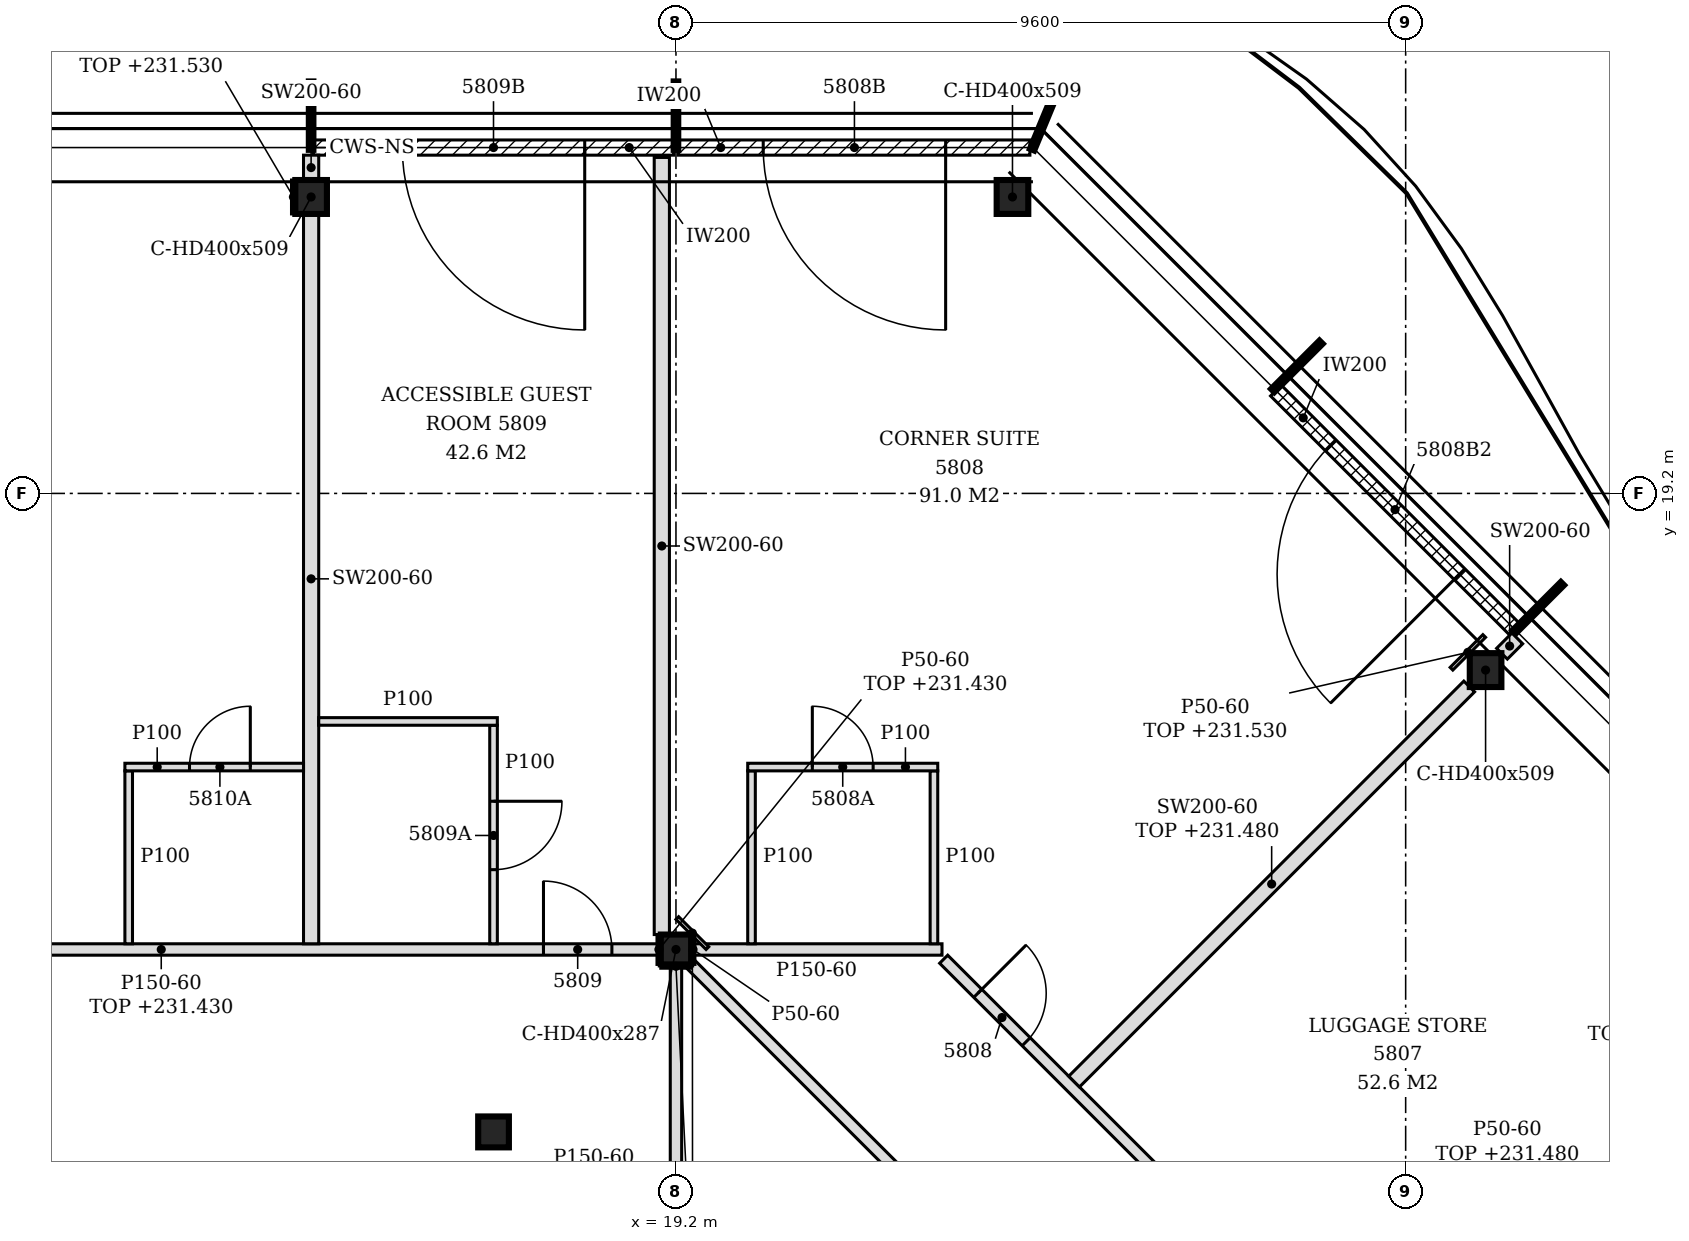
"""IFC4 building model, lengths in metres.
Left out: names, types, materials, properties, quantities, classifications, styles, units other than length and angle.
Written with IfcOpenShell. Run it as: python <this file> out.ifc"""

import sys

from ifc_helpers import new_model, si_unit, direction, frame, frame_2d, origin, origin_2d, place, context, subcontext, project, spatial, polyline, rectangle, i_section, outline, extrude, element, fill, save


model = new_model("IFC4")
c1 = context("Model", 3, precision=1e-05, world=origin(), true_north=direction((0.0, 1.0)))
c2 = subcontext(c1, "Body", "Model", "MODEL_VIEW")
j1 = project(units=[si_unit("LENGTHUNIT", "METRE"), si_unit("PLANEANGLEUNIT", "RADIAN")], contexts=[c1])
p1 = place(None, origin())
s1 = spatial("IfcSite", under=j1, at=p1, CompositionType="ELEMENT")
p2 = place(p1, origin())
s2 = spatial("IfcBuilding", under=s1, at=p2, CompositionType="ELEMENT")
p3 = place(p2, frame((0.0, 0.0, 228.6)))
s3 = spatial("IfcBuildingStorey", under=s2, at=p3, CompositionType="ELEMENT", Elevation=228.6)
for number, where, z_axis, x_axis in (
    (1, (29.852, 16.876, -0.15), (0.0, 0.0, 1.0), (1.0, 0.0, 0.0)),
    (2, (23.627, 23.1, -0.15), (0.0, 0.0, 1.0), (1.0, 0.0, 0.0)),
    (3, (14.4, 23.1, -0.15), (0.0, 0.0, 1.0), (1.0, 0.0, 0.0)),
):
    element("IfcColumn", number, at=place(p3, frame(where, z_axis=z_axis, x_axis=x_axis)), inside=s3, PredefinedType="COLUMN", context=c2, shape_type="SweptSolid", body=[
        extrude(i_section(OverallWidth=0.416, OverallDepth=0.446, WebThickness=0.039, FlangeThickness=0.063, FilletRadius=0.015, at=origin_2d()), origin(), (0.0, 0.0, 1.0), 3.6),
    ])
p4 = place(p3, frame((19.2, 13.2, -0.15), z_axis=(0.0, 0.0, 1.0), x_axis=(1.0, 0.0, 0.0)))
e4 = element("IfcColumn", 4, at=p4, inside=s3, PredefinedType="COLUMN", context=c2, shape_type="SweptSolid", body=[
    extrude(i_section(OverallWidth=0.399, OverallDepth=0.393, WebThickness=0.023, FlangeThickness=0.037, FilletRadius=0.015, at=origin_2d()), origin(), (0.0, 0.0, 1.0), 3.6),
])
p5 = place(p3, frame((16.8, 10.8, -0.15), z_axis=(0.0, 0.0, 1.0), x_axis=(1.0, 0.0, 0.0)))
e5 = element("IfcColumn", 5, at=p5, inside=s3, PredefinedType="COLUMN", context=c2, shape_type="SweptSolid", body=[
    extrude(i_section(OverallWidth=0.404, OverallDepth=0.407, WebThickness=0.027, FlangeThickness=0.044, FilletRadius=0.015, at=origin_2d()), origin(), (0.0, 0.0, 1.0), 3.6),
])
p6 = place(p3, frame((30.226, 17.42, 0.0), z_axis=(0.0, 0.0, 1.0), x_axis=(-0.707079231393, 0.707134329907, 0.0)))
e6 = element("IfcWall", 6, at=p6, inside=s3, PredefinedType="NOTDEFINED", context=c2, shape_type="SweptSolid", body=[
    extrude(rectangle(XDim=4.431, YDim=0.2, at=frame_2d((2.215, 0.0))), origin(), (0.0, 0.0, 1.0), 3.45),
])
p7 = place(p6, frame((1.015, 0.0, 0.0)))
e7 = element("IfcOpeningElement", 7, at=p7, cuts=e6, PredefinedType="OPENING", context=c2, shape_type="SweptSolid", body=[
    extrude(rectangle(XDim=2.4, YDim=2.4, at=frame_2d((1.2, 1.2))), frame((0.0, 0.11, 0.0), z_axis=(0.0, -1.0, 0.0), x_axis=(1.0, 0.0, 0.0)), (0.0, 0.0, 1.0), 0.22),
])
p8 = place(p3, frame((23.856, 23.75, 0.0), z_axis=(0.0, 0.0, 1.0), x_axis=(-1.0, 0.0, 0.0)))
e8 = element("IfcWall", 8, at=p8, inside=s3, PredefinedType="NOTDEFINED", context=c2, shape_type="SweptSolid", body=[
    extrude(rectangle(XDim=4.626, YDim=0.2, at=frame_2d((2.313, 0.0))), origin(), (0.0, 0.0, 1.0), 3.45),
])
p9 = place(p8, frame((1.108, 0.0, 0.0)))
e9 = element("IfcOpeningElement", 9, at=p9, cuts=e8, PredefinedType="OPENING", context=c2, shape_type="SweptSolid", body=[
    extrude(rectangle(XDim=2.4, YDim=2.4, at=frame_2d((1.2, 1.2))), frame((0.0, 0.11, 0.0), z_axis=(0.0, -1.0, 0.0), x_axis=(1.0, 0.0, 0.0)), (0.0, 0.0, 1.0), 0.22),
])
p10 = place(p3, frame((19.17, 23.75, 0.0), z_axis=(0.0, 0.0, 1.0), x_axis=(-1.0, 0.0, 0.0)))
e10 = element("IfcWall", 10, at=p10, inside=s3, PredefinedType="NOTDEFINED", context=c2, shape_type="SweptSolid", body=[
    extrude(rectangle(XDim=4.74, YDim=0.2, at=frame_2d((2.37, 0.0))), origin(), (0.0, 0.0, 1.0), 3.45),
])
p11 = place(p10, frame((1.17, 0.0, 0.0)))
e11 = element("IfcOpeningElement", 11, at=p11, cuts=e10, PredefinedType="OPENING", context=c2, shape_type="SweptSolid", body=[
    extrude(rectangle(XDim=2.4, YDim=2.4, at=frame_2d((1.2, 1.2))), frame((0.0, 0.11, 0.0), z_axis=(0.0, -1.0, 0.0), x_axis=(1.0, 0.0, 0.0)), (0.0, 0.0, 1.0), 0.22),
])
p12 = place(p3, frame((33.341, 2.453, 0.0), z_axis=(0.0, 0.0, 1.0), x_axis=(-0.707098652635, 0.707114909645, 0.0)))
e12 = element("IfcWall", 12, at=p12, inside=s3, PredefinedType="PARTITIONING", context=c2, shape_type="SweptSolid", body=[
    extrude(rectangle(XDim=15.018, YDim=0.15, at=frame_2d((7.509, 0.0))), origin(), (0.0, 0.0, 1.0), 2.88),
])
p13 = place(p12, frame((4.766, 0.0, 0.0)))
e13 = element("IfcOpeningElement", 13, at=p13, cuts=e12, PredefinedType="OPENING", context=c2, shape_type="SweptSolid", body=[
    extrude(rectangle(XDim=0.9, YDim=2.1, at=frame_2d((0.45, 1.05))), frame((0.0, 0.085, 0.0), z_axis=(0.0, -1.0, 0.0), x_axis=(1.0, 0.0, 0.0)), (0.0, 0.0, 1.0), 0.17),
])
p14 = place(p12, frame((9.167, 0.0, 0.0)))
e14 = element("IfcOpeningElement", 14, at=p14, cuts=e12, PredefinedType="OPENING", context=c2, shape_type="SweptSolid", body=[
    extrude(rectangle(XDim=0.9, YDim=2.1, at=frame_2d((0.45, 1.05))), frame((0.0, 0.085, 0.0), z_axis=(0.0, -1.0, 0.0), x_axis=(1.0, 0.0, 0.0)), (0.0, 0.0, 1.0), 0.17),
])
p15 = place(p12, frame((13.482, 0.0, 0.0)))
e15 = element("IfcOpeningElement", 15, at=p15, cuts=e12, PredefinedType="OPENING", context=c2, shape_type="SweptSolid", body=[
    extrude(rectangle(XDim=0.9, YDim=2.1, at=frame_2d((0.45, 1.05))), frame((0.0, 0.085, 0.0), z_axis=(0.0, -1.0, 0.0), x_axis=(1.0, 0.0, 0.0)), (0.0, 0.0, 1.0), 0.17),
])
p16 = place(p3, frame((19.2, 3.675, 0.0), z_axis=(0.0, 0.0, 1.0), x_axis=(0.0, 1.0, 0.0)))
e16 = element("IfcWall", 16, at=p16, inside=s3, PredefinedType="PARTITIONING", context=c2, shape_type="SweptSolid", body=[
    extrude(rectangle(XDim=9.328, YDim=0.15, at=frame_2d((4.664, 0.0))), origin(), (0.0, 0.0, 1.0), 2.83),
])
p17 = place(p16, frame((3.125, 0.0, 0.0)))
e17 = element("IfcOpeningElement", 17, at=p17, cuts=e16, PredefinedType="OPENING", context=c2, shape_type="SweptSolid", body=[
    extrude(rectangle(XDim=0.8, YDim=2.1, at=frame_2d((0.4, 1.05))), frame((0.0, 0.085, 0.0), z_axis=(0.0, -1.0, 0.0), x_axis=(1.0, 0.0, 0.0)), (0.0, 0.0, 1.0), 0.17),
])
p18 = place(p3, frame((28.672, 3.728, 0.0), z_axis=(0.0, 0.0, 1.0), x_axis=(-0.707116088468, 0.707097473782, 0.0)))
e18 = element("IfcWall", 18, at=p18, inside=s3, PredefinedType="PARTITIONING", context=c2, shape_type="SweptSolid", body=[
    extrude(rectangle(XDim=13.115, YDim=0.15, at=frame_2d((6.558, 0.0))), origin(), (0.0, 0.0, 1.0), 2.88),
])
p19 = place(p18, frame((6.157, 0.0, 0.0)))
e19 = element("IfcOpeningElement", 19, at=p19, cuts=e18, PredefinedType="OPENING", context=c2, shape_type="SweptSolid", body=[
    extrude(rectangle(XDim=0.9, YDim=2.1, at=frame_2d((0.45, 1.05))), frame((0.0, 0.085, 0.0), z_axis=(0.0, -1.0, 0.0), x_axis=(1.0, 0.0, 0.0)), (0.0, 0.0, 1.0), 0.17),
])
p20 = place(p3, frame((30.662, 5.238, 0.0), z_axis=(0.0, 0.0, 1.0), x_axis=(0.707106781187, 0.707106781187, 0.0)))
e20 = element("IfcWall", 20, at=p20, inside=s3, PredefinedType="PARTITIONING", context=c2, shape_type="SweptSolid", body=[
    extrude(rectangle(XDim=7.351, YDim=0.2, at=frame_2d((3.676, 0.0))), origin(), (0.0, 0.0, 1.0), 2.93),
])
p21 = place(p3, frame((31.398, 9.798, 0.0), z_axis=(0.0, 0.0, 1.0), x_axis=(0.707133900936, 0.707079660397, 0.0)))
e21 = element("IfcWall", 21, at=p21, inside=s3, PredefinedType="PARTITIONING", context=c2, shape_type="SweptSolid", body=[
    extrude(rectangle(XDim=4.501, YDim=0.2, at=frame_2d((2.25, 0.0))), origin(), (0.0, 0.0, 1.0), 2.63),
])
p22 = place(p3, frame((24.438, 11.462, 0.0), z_axis=(0.0, 0.0, 1.0), x_axis=(0.707090175614, 0.707123386369, 0.0)))
e22 = element("IfcWall", 22, at=p22, inside=s3, PredefinedType="PARTITIONING", context=c2, shape_type="SweptSolid", body=[
    extrude(rectangle(XDim=7.351, YDim=0.2, at=frame_2d((3.676, 0.0))), origin(), (0.0, 0.0, 1.0), 2.88),
])
p23 = place(p3, frame((7.399, 13.2, 0.0), z_axis=(0.0, 0.0, 1.0), x_axis=(1.0, 0.0, 0.0)))
e23 = element("IfcWall", 23, at=p23, inside=s3, PredefinedType="PARTITIONING", context=c2, shape_type="SweptSolid", body=[
    extrude(rectangle(XDim=11.601, YDim=0.15, at=frame_2d((5.801, 0.0))), origin(), (0.0, 0.0, 1.0), 2.83),
])
p24 = place(p23, frame((10.058, 0.0, 0.0)))
e24 = element("IfcOpeningElement", 24, at=p24, cuts=e23, PredefinedType="OPENING", context=c2, shape_type="SweptSolid", body=[
    extrude(rectangle(XDim=0.9, YDim=2.1, at=frame_2d((0.45, 1.05))), frame((0.0, 0.085, 0.0), z_axis=(0.0, -1.0, 0.0), x_axis=(1.0, 0.0, 0.0)), (0.0, 0.0, 1.0), 0.17),
])
p25 = place(p3, frame((19.399, 13.2, 0.0), z_axis=(0.0, 0.0, 1.0), x_axis=(1.0, 0.0, 0.0)))
e25 = element("IfcWall", 25, at=p25, inside=s3, PredefinedType="PARTITIONING", context=c2, shape_type="SweptSolid", body=[
    extrude(rectangle(XDim=3.301, YDim=0.15, at=frame_2d((1.65, 0.0))), origin(), (0.0, 0.0, 1.0), 3.45),
])
p26 = place(p3, frame((12.0, 13.275, 0.0), z_axis=(0.0, 0.0, 1.0), x_axis=(0.0, 1.0, 0.0)))
e26 = element("IfcWall", 26, at=p26, inside=s3, PredefinedType="PARTITIONING", context=c2, shape_type="SweptSolid", body=[
    extrude(outline(polyline([(0.0, 0.0), (2.275, 0.0), (2.275, 3.45), (0.075, 3.45), (0.073, 2.83), (0.0, 2.83), (0.0, 0.0)])), frame((0.0, 0.05, 0.0), z_axis=(0.0, -1.0, 0.0), x_axis=(1.0, 0.0, 0.0)), (0.0, 0.0, 1.0), 0.1),
])
p27 = place(p3, frame((14.4, 13.275, 0.0), z_axis=(0.0, 0.0, 1.0), x_axis=(0.0, 1.0, 0.0)))
e27 = element("IfcWall", 27, at=p27, inside=s3, PredefinedType="PARTITIONING", context=c2, shape_type="SweptSolid", body=[
    extrude(outline(polyline([(0.0, 0.0), (9.602, 0.0), (9.602, 3.45), (6.03, 3.45), (6.028, 2.88), (5.82, 2.88), (5.818, 3.45), (0.075, 3.45), (0.073, 2.83), (0.0, 2.83), (0.0, 0.0)])), frame((0.0, 0.1, 0.0), z_axis=(0.0, -1.0, 0.0), x_axis=(1.0, 0.0, 0.0)), (0.0, 0.0, 1.0), 0.2),
])
p28 = place(p3, frame((16.8, 13.275, 0.0), z_axis=(0.0, 0.0, 1.0), x_axis=(0.0, 1.0, 0.0)))
e28 = element("IfcWall", 28, at=p28, inside=s3, PredefinedType="PARTITIONING", context=c2, shape_type="SweptSolid", body=[
    extrude(outline(polyline([(0.0, 0.0), (2.875, 0.0), (2.875, 3.45), (0.075, 3.45), (0.073, 2.83), (0.0, 2.83), (0.0, 0.0)])), frame((0.0, 0.05, 0.0), z_axis=(0.0, -1.0, 0.0), x_axis=(1.0, 0.0, 0.0)), (0.0, 0.0, 1.0), 0.1),
])
p29 = place(p28, frame((0.975, 0.0, 0.0)))
e29 = element("IfcOpeningElement", 29, at=p29, cuts=e28, PredefinedType="OPENING", context=c2, shape_type="SweptSolid", body=[
    extrude(rectangle(XDim=0.9, YDim=2.1, at=frame_2d((0.45, 1.05))), frame((0.0, 0.06, 0.0), z_axis=(0.0, -1.0, 0.0), x_axis=(1.0, 0.0, 0.0)), (0.0, 0.0, 1.0), 0.12),
])
for number, where, z_axis, x_axis in (
    (30, (20.194, 13.275, 0.0), (0.0, 0.0, 1.0), (0.0, 1.0, 0.0)),
    (31, (22.594, 13.275, 0.0), (0.0, 0.0, 1.0), (0.0, 1.0, 0.0)),
):
    element("IfcWall", number, at=place(p3, frame(where, z_axis=z_axis, x_axis=x_axis)), inside=s3, PredefinedType="PARTITIONING", context=c2, shape_type="SweptSolid", body=[
        extrude(outline(polyline([(0.0, 0.0), (2.275, 0.0), (2.275, 3.45), (1.23, 3.45), (1.228, 2.88), (1.02, 2.88), (1.018, 3.45), (0.0, 3.45), (0.0, 0.0)])), frame((0.0, 0.05, 0.0), z_axis=(0.0, -1.0, 0.0), x_axis=(1.0, 0.0, 0.0)), (0.0, 0.0, 1.0), 0.1),
    ])
p30 = place(p3, frame((19.014, 13.396, 0.0), z_axis=(0.0, 0.0, 1.0), x_axis=(0.0, 1.0, 0.0)))
e32 = element("IfcWall", 32, at=p30, inside=s3, PredefinedType="PARTITIONING", context=c2, shape_type="SweptSolid", body=[
    extrude(outline(polyline([(0.0, 0.0), (10.224, 0.0), (10.223, 3.45), (9.854, 3.45), (9.852, 2.93), (5.908, 2.93), (5.906, 2.88), (5.698, 2.88), (5.697, 2.93), (0.003, 2.93), (0.001, 3.45), (0.0, 3.45), (0.0, 0.0)])), frame((0.0, 0.1, 0.0), z_axis=(0.0, -1.0, 0.0), x_axis=(1.0, 0.0, 0.0)), (0.0, 0.0, 1.0), 0.2),
])
p31 = place(p3, frame((11.95, 15.6, 0.0), z_axis=(0.0, 0.0, 1.0), x_axis=(1.0, 0.0, 0.0)))
e33 = element("IfcWall", 33, at=p31, inside=s3, PredefinedType="PARTITIONING", context=c2, shape_type="SweptSolid", body=[
    extrude(rectangle(XDim=2.35, YDim=0.1, at=frame_2d((1.175, 0.0))), origin(), (0.0, 0.0, 1.0), 3.45),
])
p32 = place(p31, frame((0.85, 0.0, 0.0)))
e34 = element("IfcOpeningElement", 34, at=p32, cuts=e33, PredefinedType="OPENING", context=c2, shape_type="SweptSolid", body=[
    extrude(rectangle(XDim=0.8, YDim=2.1, at=frame_2d((0.4, 1.05))), frame((0.0, 0.06, 0.0), z_axis=(0.0, -1.0, 0.0), x_axis=(1.0, 0.0, 0.0)), (0.0, 0.0, 1.0), 0.12),
])
p33 = place(p3, frame((20.144, 15.6, 0.0), z_axis=(0.0, 0.0, 1.0), x_axis=(1.0, 0.0, 0.0)))
e35 = element("IfcWall", 35, at=p33, inside=s3, PredefinedType="PARTITIONING", context=c2, shape_type="SweptSolid", body=[
    extrude(rectangle(XDim=2.5, YDim=0.1, at=frame_2d((1.25, 0.0))), origin(), (0.0, 0.0, 1.0), 3.45),
])
p34 = place(p33, frame((0.85, 0.0, 0.0)))
e36 = element("IfcOpeningElement", 36, at=p34, cuts=e35, PredefinedType="OPENING", context=c2, shape_type="SweptSolid", body=[
    extrude(rectangle(XDim=0.8, YDim=2.1, at=frame_2d((0.4, 1.05))), frame((0.0, 0.06, 0.0), z_axis=(0.0, -1.0, 0.0), x_axis=(1.0, 0.0, 0.0)), (0.0, 0.0, 1.0), 0.12),
])
p35 = place(p3, frame((14.5, 16.2, 0.0), z_axis=(0.0, 0.0, 1.0), x_axis=(1.0, 0.0, 0.0)))
e37 = element("IfcWall", 37, at=p35, inside=s3, PredefinedType="PARTITIONING", context=c2, shape_type="SweptSolid", body=[
    extrude(rectangle(XDim=2.35, YDim=0.1, at=frame_2d((1.175, 0.0))), origin(), (0.0, 0.0, 1.0), 3.45),
])
p36 = place(p3, frame((30.067, 17.091, 0.0), z_axis=(0.0, 0.0, 1.0), x_axis=(0.707106781187, 0.707106781187, 0.0)))
e38 = element("IfcWall", 38, at=p36, inside=s3, PredefinedType="PARTITIONING", context=c2, shape_type="SweptSolid", body=[
    extrude(rectangle(XDim=0.285, YDim=0.2, at=frame_2d((0.143, 0.0))), origin(), (0.0, 0.0, 1.0), 3.45),
])
p37 = place(p3, frame((14.4, 23.323, 0.0), z_axis=(0.0, 0.0, 1.0), x_axis=(0.0, 1.0, 0.0)))
e39 = element("IfcWall", 39, at=p37, inside=s3, PredefinedType="PARTITIONING", context=c2, shape_type="SweptSolid", body=[
    extrude(rectangle(XDim=0.327, YDim=0.2, at=frame_2d((0.164, 0.0))), origin(), (0.0, 0.0, 1.0), 3.45),
])
p38 = place(p3, frame((18.976, 13.003, 0.0), z_axis=(0.0, 0.0, 1.0), x_axis=(0.0, 1.0, 0.0)))
e40 = element("IfcWall", 40, at=p38, inside=s3, PredefinedType="PARTITIONING", context=c2, shape_type="SweptSolid", body=[
    extrude(rectangle(XDim=0.393, YDim=0.05, at=frame_2d((0.197, 0.0))), origin(), (0.0, 0.0, 1.0), 2.83),
])
p39 = place(p3, frame((19.614, 13.218, 0.0), z_axis=(0.0, 0.0, 1.0), x_axis=(-0.707106781187, 0.707106781187, 0.0)))
e41 = element("IfcWall", 41, at=p39, inside=s3, PredefinedType="PARTITIONING", context=c2, shape_type="SweptSolid", body=[
    extrude(rectangle(XDim=0.56, YDim=0.05, at=frame_2d((0.28, 0.0))), origin(), (0.0, 0.0, 1.0), 2.93),
])
p40 = place(p3, frame((29.403, 16.893, 0.0), z_axis=(0.0, 0.0, 1.0), x_axis=(0.706906496032, 0.707307009627, 0.0)))
e42 = element("IfcWall", 42, at=p40, inside=s3, PredefinedType="PARTITIONING", context=c2, shape_type="SweptSolid", body=[
    extrude(rectangle(XDim=0.61, YDim=0.05, at=frame_2d((0.305, 0.0))), origin(), (0.0, 0.0, 1.0), 2.93),
])
p41 = place(p3, frame((19.0, 12.979, 0.0), z_axis=(0.0, 0.0, 1.0), x_axis=(1.0, 0.0, 0.0)))
e43 = element("IfcWall", 43, at=p41, inside=s3, PredefinedType="PARTITIONING", context=c2, shape_type="SweptSolid", body=[
    extrude(rectangle(XDim=0.399, YDim=0.05, at=frame_2d((0.199, 0.0))), origin(), (0.0, 0.0, 1.0), 2.83),
])
p42 = place(p3, frame((14.167, 22.877, 0.0), z_axis=(0.0, 0.0, 1.0), x_axis=(0.0, 1.0, 0.0)))
e44 = element("IfcWall", 44, at=p42, inside=s3, PredefinedType="PARTITIONING", context=c2, shape_type="SweptSolid", body=[
    extrude(rectangle(XDim=0.446, YDim=0.05, at=frame_2d((0.223, 0.0))), origin(), (0.0, 0.0, 1.0), 2.93),
])
p43 = place(p3, frame((19.425, 13.003, 0.0), z_axis=(0.0, 0.0, 1.0), x_axis=(0.0, 1.0, 0.0)))
e45 = element("IfcWall", 45, at=p43, inside=s3, PredefinedType="PARTITIONING", context=c2, shape_type="SweptSolid", body=[
    extrude(rectangle(XDim=0.393, YDim=0.05, at=frame_2d((0.197, 0.0))), origin(), (0.0, 0.0, 1.0), 3.45),
])
p44 = place(p7, origin())
e46 = element("IfcDoor", 46, at=p44, inside=s3, OperationType="SINGLE_SWING_LEFT", PredefinedType="DOOR", context=c2, shape_type="SweptSolid", body=[
    extrude(rectangle(XDim=2.4, YDim=2.4, at=frame_2d((1.2, 1.2))), frame((0.0, 0.025, 0.0), z_axis=(0.0, -1.0, 0.0), x_axis=(1.0, 0.0, 0.0)), (0.0, 0.0, 1.0), 0.05),
])
fill(e7, e46)
p45 = place(p9, origin())
e47 = element("IfcDoor", 47, at=p45, inside=s3, OperationType="SINGLE_SWING_LEFT", PredefinedType="DOOR", context=c2, shape_type="SweptSolid", body=[
    extrude(rectangle(XDim=2.4, YDim=2.4, at=frame_2d((1.2, 1.2))), frame((0.0, 0.025, 0.0), z_axis=(0.0, -1.0, 0.0), x_axis=(1.0, 0.0, 0.0)), (0.0, 0.0, 1.0), 0.05),
])
fill(e9, e47)
p46 = place(p11, origin())
e48 = element("IfcDoor", 48, at=p46, inside=s3, OperationType="SINGLE_SWING_LEFT", PredefinedType="DOOR", context=c2, shape_type="SweptSolid", body=[
    extrude(rectangle(XDim=2.4, YDim=2.4, at=frame_2d((1.2, 1.2))), frame((0.0, 0.025, 0.0), z_axis=(0.0, -1.0, 0.0), x_axis=(1.0, 0.0, 0.0)), (0.0, 0.0, 1.0), 0.05),
])
fill(e11, e48)
p47 = place(p15, frame((0.9, 0.0, 0.0), z_axis=(0.0, 0.0, 1.0), x_axis=(-1.0, 0.0, 0.0)))
e49 = element("IfcDoor", 49, at=p47, inside=s3, OperationType="SINGLE_SWING_LEFT", PredefinedType="DOOR", context=c2, shape_type="SweptSolid", body=[
    extrude(rectangle(XDim=0.9, YDim=2.1, at=frame_2d((0.45, 1.05))), frame((0.0, 0.025, 0.0), z_axis=(0.0, -1.0, 0.0), x_axis=(1.0, 0.0, 0.0)), (0.0, 0.0, 1.0), 0.05),
])
fill(e15, e49)
p48 = place(p34, origin())
e50 = element("IfcDoor", 50, at=p48, inside=s3, OperationType="SINGLE_SWING_LEFT", PredefinedType="DOOR", context=c2, shape_type="SweptSolid", body=[
    extrude(rectangle(XDim=0.8, YDim=2.1, at=frame_2d((0.4, 1.05))), frame((0.0, 0.025, 0.0), z_axis=(0.0, -1.0, 0.0), x_axis=(1.0, 0.0, 0.0)), (0.0, 0.0, 1.0), 0.05),
])
fill(e36, e50)
p49 = place(p24, origin())
e51 = element("IfcDoor", 51, at=p49, inside=s3, OperationType="SINGLE_SWING_LEFT", PredefinedType="DOOR", context=c2, shape_type="SweptSolid", body=[
    extrude(rectangle(XDim=0.9, YDim=2.1, at=frame_2d((0.45, 1.05))), frame((0.0, 0.025, 0.0), z_axis=(0.0, -1.0, 0.0), x_axis=(1.0, 0.0, 0.0)), (0.0, 0.0, 1.0), 0.05),
])
fill(e24, e51)
p50 = place(p29, frame((0.9, 0.0, 0.0), z_axis=(0.0, 0.0, 1.0), x_axis=(-1.0, 0.0, 0.0)))
e52 = element("IfcDoor", 52, at=p50, inside=s3, OperationType="SINGLE_SWING_LEFT", PredefinedType="DOOR", context=c2, shape_type="SweptSolid", body=[
    extrude(rectangle(XDim=0.9, YDim=2.1, at=frame_2d((0.45, 1.05))), frame((0.0, 0.025, 0.0), z_axis=(0.0, -1.0, 0.0), x_axis=(1.0, 0.0, 0.0)), (0.0, 0.0, 1.0), 0.05),
])
fill(e29, e52)
p51 = place(p32, origin())
e53 = element("IfcDoor", 53, at=p51, inside=s3, OperationType="SINGLE_SWING_RIGHT", PredefinedType="DOOR", context=c2, shape_type="SweptSolid", body=[
    extrude(rectangle(XDim=0.8, YDim=2.1, at=frame_2d((0.4, 1.05))), frame((0.0, 0.025, 0.0), z_axis=(0.0, -1.0, 0.0), x_axis=(1.0, 0.0, 0.0)), (0.0, 0.0, 1.0), 0.05),
])
fill(e34, e53)
save(model, sys.argv[1])
